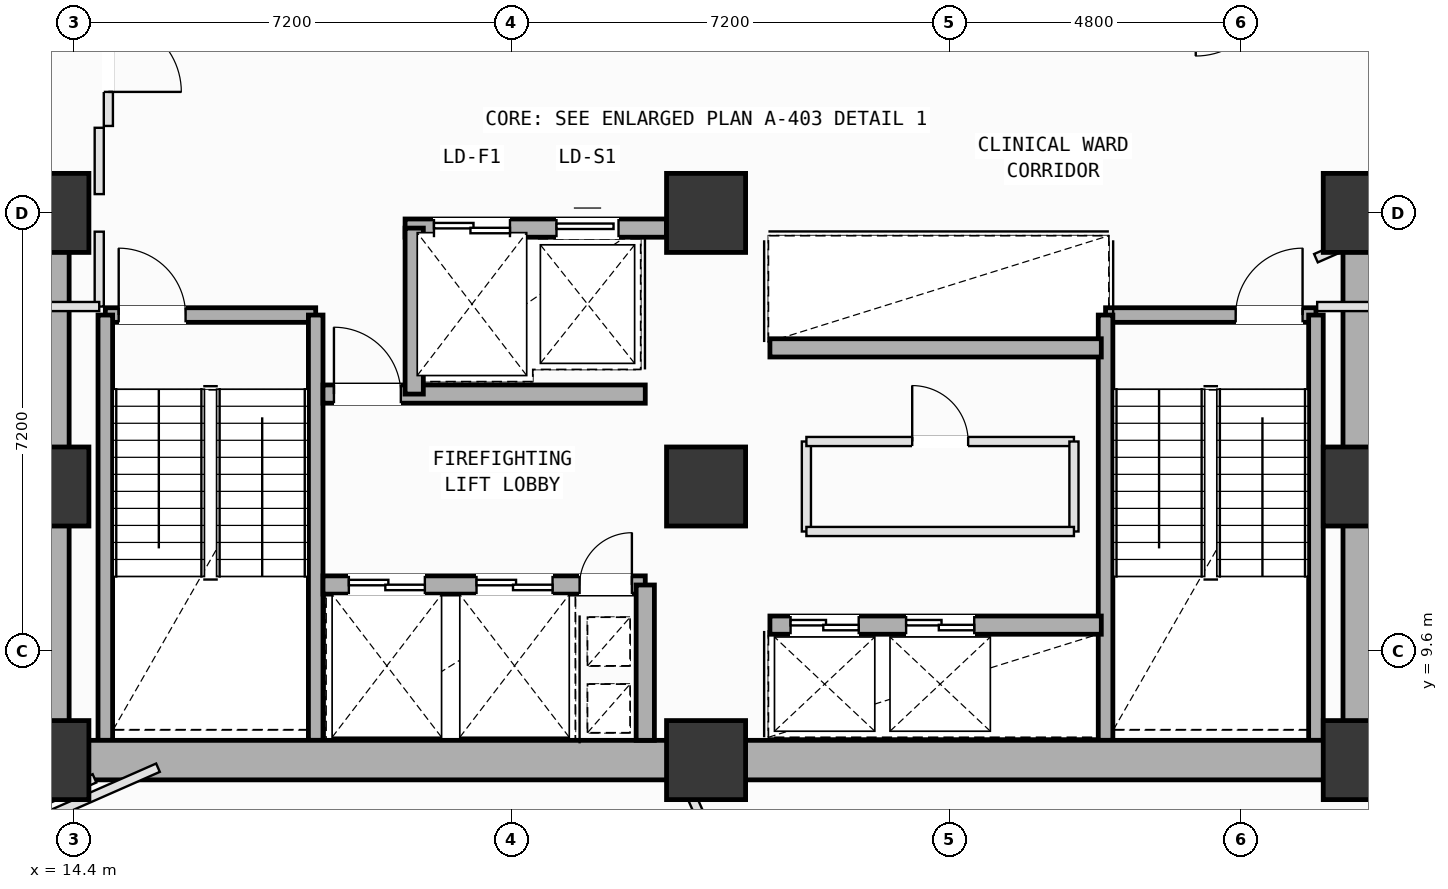
"""IFC4 building model, lengths in metres.
Left out: names, types, materials, properties, quantities, classifications, styles, units other than length and angle.
Written with IfcOpenShell. Run it as: python <this file> out.ifc"""

import sys

from ifc_helpers import new_model, si_unit, direction, frame, frame_2d, origin, origin_2d, place, context, subcontext, project, spatial, rectangle, extrude, element, fill, save


model = new_model("IFC4")
c1 = context("Model", 3, precision=1e-05, world=origin(), true_north=direction((0.0, 1.0)))
c2 = subcontext(c1, "Body", "Model", "MODEL_VIEW")
j1 = project(units=[si_unit("LENGTHUNIT", "METRE"), si_unit("PLANEANGLEUNIT", "RADIAN")], contexts=[c1])
p1 = place(None, origin())
s1 = spatial("IfcSite", under=j1, at=p1, CompositionType="ELEMENT")
p2 = place(p1, origin())
s2 = spatial("IfcBuilding", under=s1, at=p2, CompositionType="ELEMENT")
p3 = place(p2, frame((0.0, 0.0, 124.4)))
s3 = spatial("IfcBuildingStorey", under=s2, at=p3, CompositionType="ELEMENT", Elevation=124.4)
for number, where, z_axis, x_axis in (
    (1, (14.0, 7.8, 0.0), (0.0, 0.0, 1.0), (1.0, 0.0, 0.0)),
    (2, (14.0, 12.3, 0.0), (0.0, 0.0, 1.0), (1.0, 0.0, 0.0)),
    (3, (14.0, 16.8, 0.0), (0.0, 0.0, 1.0), (1.0, 0.0, 0.0)),
    (4, (24.8, 7.8, 0.0), (0.0, 0.0, 1.0), (1.0, 0.0, 0.0)),
    (5, (24.8, 12.3, 0.0), (0.0, 0.0, 1.0), (1.0, 0.0, 0.0)),
    (6, (24.8, 16.8, 0.0), (0.0, 0.0, 1.0), (1.0, 0.0, 0.0)),
    (7, (35.6, 7.8, 0.0), (0.0, 0.0, 1.0), (1.0, 0.0, 0.0)),
    (8, (35.6, 12.3, 0.0), (0.0, 0.0, 1.0), (1.0, 0.0, 0.0)),
    (9, (35.6, 16.8, 0.0), (0.0, 0.0, 1.0), (1.0, 0.0, 0.0)),
):
    element("IfcColumn", number, at=place(p3, frame(where, z_axis=z_axis, x_axis=x_axis)), inside=s3, PredefinedType="COLUMN", context=c2, shape_type="SweptSolid", body=[
        extrude(rectangle(XDim=1.3, YDim=1.3, at=origin_2d()), origin(), (0.0, 0.0, 1.0), 4.0),
    ])
p4 = place(p3, frame((14.92, 15.12, 0.0), z_axis=(0.0, 0.0, 1.0), x_axis=(1.0, 0.0, 0.0)))
e10 = element("IfcWall", 10, at=p4, inside=s3, PredefinedType="SOLIDWALL", context=c2, shape_type="SweptSolid", body=[
    extrude(rectangle(XDim=3.46, YDim=0.24, at=frame_2d((1.73, 0.0))), origin(), (0.0, 0.0, 1.0), 3.78),
])
p5 = place(p4, frame((0.22, 0.0, 0.0)))
e11 = element("IfcOpeningElement", 11, at=p5, cuts=e10, PredefinedType="OPENING", context=c2, shape_type="SweptSolid", body=[
    extrude(rectangle(XDim=1.1, YDim=2.15, at=frame_2d((0.55, 1.075))), frame((0.0, 0.13, 0.0), z_axis=(0.0, -1.0, 0.0), x_axis=(1.0, 0.0, 0.0)), (0.0, 0.0, 1.0), 0.26),
])
for number, where, z_axis, x_axis in (
    (12, (18.38, 15.12, 0.0), (0.0, 0.0, 1.0), (0.0, -1.0, 0.0)),
    (13, (14.92, 8.125, 0.0), (0.0, 0.0, 1.0), (0.0, 1.0, 0.0)),
):
    element("IfcWall", number, at=place(p3, frame(where, z_axis=z_axis, x_axis=x_axis)), inside=s3, PredefinedType="SOLIDWALL", context=c2, shape_type="SweptSolid", body=[
        extrude(rectangle(XDim=6.995, YDim=0.24, at=frame_2d((3.498, 0.0))), origin(), (0.0, 0.0, 1.0), 3.78),
    ])
p6 = place(p3, frame((31.37, 15.12, 0.0), z_axis=(0.0, 0.0, 1.0), x_axis=(1.0, 0.0, 0.0)))
e14 = element("IfcWall", 14, at=p6, inside=s3, PredefinedType="SOLIDWALL", context=c2, shape_type="SweptSolid", body=[
    extrude(rectangle(XDim=3.46, YDim=0.24, at=frame_2d((1.73, 0.0))), origin(), (0.0, 0.0, 1.0), 3.78),
])
p7 = place(p6, frame((2.14, 0.0, 0.0)))
e15 = element("IfcOpeningElement", 15, at=p7, cuts=e14, PredefinedType="OPENING", context=c2, shape_type="SweptSolid", body=[
    extrude(rectangle(XDim=1.1, YDim=2.15, at=frame_2d((0.55, 1.075))), frame((0.0, 0.13, 0.0), z_axis=(0.0, -1.0, 0.0), x_axis=(1.0, 0.0, 0.0)), (0.0, 0.0, 1.0), 0.26),
])
for number, where, z_axis, x_axis in (
    (16, (34.83, 15.12, 0.0), (0.0, 0.0, 1.0), (0.0, -1.0, 0.0)),
    (17, (31.37, 8.125, 0.0), (0.0, 0.0, 1.0), (0.0, 1.0, 0.0)),
):
    element("IfcWall", number, at=place(p3, frame(where, z_axis=z_axis, x_axis=x_axis)), inside=s3, PredefinedType="SOLIDWALL", context=c2, shape_type="SweptSolid", body=[
        extrude(rectangle(XDim=6.995, YDim=0.24, at=frame_2d((3.498, 0.0))), origin(), (0.0, 0.0, 1.0), 3.78),
    ])
for number, where, z_axis, x_axis in (
    (18, (14.0, 7.8, 0.0), (0.0, 0.0, 1.0), (1.0, 0.0, 0.0)),
    (19, (24.8, 7.8, 0.0), (0.0, 0.0, 1.0), (1.0, 0.0, 0.0)),
):
    element("IfcWall", number, at=place(p3, frame(where, z_axis=z_axis, x_axis=x_axis)), inside=s3, PredefinedType="SHEAR", context=c2, shape_type="SweptSolid", body=[
        extrude(rectangle(XDim=10.8, YDim=0.65, at=frame_2d((5.4, 0.0))), origin(), (0.0, 0.0, 1.0), 3.78),
    ])
for number, where, z_axis, x_axis in (
    (20, (35.6, 7.8, 0.0), (0.0, 0.0, 1.0), (0.0, 1.0, 0.0)),
    (21, (14.0, 16.8, 0.0), (0.0, 0.0, 1.0), (0.0, -1.0, 0.0)),
):
    element("IfcWall", number, at=place(p3, frame(where, z_axis=z_axis, x_axis=x_axis)), inside=s3, PredefinedType="SHEAR", context=c2, shape_type="SweptSolid", body=[
        extrude(rectangle(XDim=9.0, YDim=0.65, at=frame_2d((4.5, 0.0))), origin(), (0.0, 0.0, 1.0), 3.78),
    ])
p8 = place(p3, frame((19.85, 16.55, 0.0), z_axis=(0.0, 0.0, 1.0), x_axis=(1.0, 0.0, 0.0)))
e22 = element("IfcWall", 22, at=p8, inside=s3, PredefinedType="SOLIDWALL", context=c2, shape_type="SweptSolid", body=[
    extrude(rectangle(XDim=4.3, YDim=0.3, at=frame_2d((2.15, 0.0))), origin(), (0.0, 0.0, 1.0), 3.78),
])
p9 = place(p8, frame((0.475, 0.0, 0.0)))
e23 = element("IfcOpeningElement", 23, at=p9, cuts=e22, PredefinedType="OPENING", context=c2, shape_type="SweptSolid", body=[
    extrude(rectangle(XDim=1.25, YDim=2.18, at=frame_2d((0.625, 1.09))), frame((0.0, 0.16, 0.0), z_axis=(0.0, -1.0, 0.0), x_axis=(1.0, 0.0, 0.0)), (0.0, 0.0, 1.0), 0.32),
])
p10 = place(p8, frame((2.49, 0.0, 0.0)))
e24 = element("IfcOpeningElement", 24, at=p10, cuts=e22, PredefinedType="OPENING", context=c2, shape_type="SweptSolid", body=[
    extrude(rectangle(XDim=1.02, YDim=2.12, at=frame_2d((0.51, 1.06))), frame((0.0, 0.16, 0.0), z_axis=(0.0, -1.0, 0.0), x_axis=(1.0, 0.0, 0.0)), (0.0, 0.0, 1.0), 0.32),
])
p11 = place(p3, frame((18.5, 10.68, 0.0), z_axis=(0.0, 0.0, 1.0), x_axis=(1.0, 0.0, 0.0)))
e25 = element("IfcWall", 25, at=p11, inside=s3, PredefinedType="SOLIDWALL", context=c2, shape_type="SweptSolid", body=[
    extrude(rectangle(XDim=5.3, YDim=0.3, at=frame_2d((2.65, 0.0))), origin(), (0.0, 0.0, 1.0), 3.78),
])
p12 = place(p11, frame((4.22, 0.0, 0.0)))
e26 = element("IfcOpeningElement", 26, at=p12, cuts=e25, PredefinedType="OPENING", context=c2, shape_type="SweptSolid", body=[
    extrude(rectangle(XDim=0.86, YDim=2.06, at=frame_2d((0.43, 1.03))), frame((0.0, 0.16, 0.0), z_axis=(0.0, -1.0, 0.0), x_axis=(1.0, 0.0, 0.0)), (0.0, 0.0, 1.0), 0.32),
])
p13 = place(p11, frame((0.425, 0.0, 0.0)))
e27 = element("IfcOpeningElement", 27, at=p13, cuts=e25, PredefinedType="OPENING", context=c2, shape_type="SweptSolid", body=[
    extrude(rectangle(XDim=1.25, YDim=2.18, at=frame_2d((0.625, 1.09))), frame((0.0, 0.16, 0.0), z_axis=(0.0, -1.0, 0.0), x_axis=(1.0, 0.0, 0.0)), (0.0, 0.0, 1.0), 0.32),
])
p14 = place(p11, frame((2.525, 0.0, 0.0)))
e28 = element("IfcOpeningElement", 28, at=p14, cuts=e25, PredefinedType="OPENING", context=c2, shape_type="SweptSolid", body=[
    extrude(rectangle(XDim=1.25, YDim=2.18, at=frame_2d((0.625, 1.09))), frame((0.0, 0.16, 0.0), z_axis=(0.0, -1.0, 0.0), x_axis=(1.0, 0.0, 0.0)), (0.0, 0.0, 1.0), 0.32),
])
p15 = place(p3, frame((18.5, 13.82, 0.0), z_axis=(0.0, 0.0, 1.0), x_axis=(1.0, 0.0, 0.0)))
e29 = element("IfcWall", 29, at=p15, inside=s3, PredefinedType="SOLIDWALL", context=c2, shape_type="SweptSolid", body=[
    extrude(rectangle(XDim=5.3, YDim=0.3, at=frame_2d((2.65, 0.0))), origin(), (0.0, 0.0, 1.0), 3.78),
])
p16 = place(p15, frame((0.18, 0.0, 0.0)))
e30 = element("IfcOpeningElement", 30, at=p16, cuts=e29, PredefinedType="OPENING", context=c2, shape_type="SweptSolid", body=[
    extrude(rectangle(XDim=1.1, YDim=2.15, at=frame_2d((0.55, 1.075))), frame((0.0, 0.16, 0.0), z_axis=(0.0, -1.0, 0.0), x_axis=(1.0, 0.0, 0.0)), (0.0, 0.0, 1.0), 0.32),
])
p17 = place(p3, frame((23.8, 8.125, 0.0), z_axis=(0.0, 0.0, 1.0), x_axis=(0.0, 1.0, 0.0)))
e31 = element("IfcWall", 31, at=p17, inside=s3, PredefinedType="SOLIDWALL", context=c2, shape_type="SweptSolid", body=[
    extrude(rectangle(XDim=2.555, YDim=0.3, at=frame_2d((1.277, 0.0))), origin(), (0.0, 0.0, 1.0), 3.78),
])
p18 = place(p3, frame((20.0, 13.82, 0.0), z_axis=(0.0, 0.0, 1.0), x_axis=(0.0, 1.0, 0.0)))
e32 = element("IfcWall", 32, at=p18, inside=s3, PredefinedType="SOLIDWALL", context=c2, shape_type="SweptSolid", body=[
    extrude(rectangle(XDim=2.73, YDim=0.3, at=frame_2d((1.365, 0.0))), origin(), (0.0, 0.0, 1.0), 3.78),
])
p19 = place(p3, frame((25.85, 10.02, 0.0), z_axis=(0.0, 0.0, 1.0), x_axis=(1.0, 0.0, 0.0)))
e33 = element("IfcWall", 33, at=p19, inside=s3, PredefinedType="SOLIDWALL", context=c2, shape_type="SweptSolid", body=[
    extrude(rectangle(XDim=5.45, YDim=0.3, at=frame_2d((2.725, 0.0))), origin(), (0.0, 0.0, 1.0), 3.78),
])
p20 = place(p19, frame((0.34, 0.0, 0.0)))
e34 = element("IfcOpeningElement", 34, at=p20, cuts=e33, PredefinedType="OPENING", context=c2, shape_type="SweptSolid", body=[
    extrude(rectangle(XDim=1.12, YDim=2.15, at=frame_2d((0.56, 1.075))), frame((0.0, 0.16, 0.0), z_axis=(0.0, -1.0, 0.0), x_axis=(1.0, 0.0, 0.0)), (0.0, 0.0, 1.0), 0.32),
])
p21 = place(p19, frame((2.24, 0.0, 0.0)))
e35 = element("IfcOpeningElement", 35, at=p21, cuts=e33, PredefinedType="OPENING", context=c2, shape_type="SweptSolid", body=[
    extrude(rectangle(XDim=1.12, YDim=2.15, at=frame_2d((0.56, 1.075))), frame((0.0, 0.16, 0.0), z_axis=(0.0, -1.0, 0.0), x_axis=(1.0, 0.0, 0.0)), (0.0, 0.0, 1.0), 0.32),
])
p22 = place(p3, frame((25.85, 14.58, 0.0), z_axis=(0.0, 0.0, 1.0), x_axis=(1.0, 0.0, 0.0)))
e36 = element("IfcWall", 36, at=p22, inside=s3, PredefinedType="SOLIDWALL", context=c2, shape_type="SweptSolid", body=[
    extrude(rectangle(XDim=5.45, YDim=0.3, at=frame_2d((2.725, 0.0))), origin(), (0.0, 0.0, 1.0), 3.78),
])
p23 = place(p3, frame((26.45, 11.56, 0.0), z_axis=(0.0, 0.0, 1.0), x_axis=(0.0, 1.0, 0.0)))
e37 = element("IfcWall", 37, at=p23, inside=s3, PredefinedType="PARTITIONING", context=c2, shape_type="SweptSolid", body=[
    extrude(rectangle(XDim=1.48, YDim=0.15, at=frame_2d((0.74, 0.0))), origin(), (0.0, 0.0, 1.0), 3.78),
])
p24 = place(p3, frame((26.45, 13.04, 0.0), z_axis=(0.0, 0.0, 1.0), x_axis=(1.0, 0.0, 0.0)))
e38 = element("IfcWall", 38, at=p24, inside=s3, PredefinedType="PARTITIONING", context=c2, shape_type="SweptSolid", body=[
    extrude(rectangle(XDim=4.4, YDim=0.15, at=frame_2d((2.2, 0.0))), origin(), (0.0, 0.0, 1.0), 3.78),
])
p25 = place(p24, frame((1.74, 0.0, 0.0)))
e39 = element("IfcOpeningElement", 39, at=p25, cuts=e38, PredefinedType="OPENING", context=c2, shape_type="SweptSolid", body=[
    extrude(rectangle(XDim=0.92, YDim=2.1, at=frame_2d((0.46, 1.05))), frame((0.0, 0.085, 0.0), z_axis=(0.0, -1.0, 0.0), x_axis=(1.0, 0.0, 0.0)), (0.0, 0.0, 1.0), 0.17),
])
p26 = place(p3, frame((30.85, 13.04, 0.0), z_axis=(0.0, 0.0, 1.0), x_axis=(0.0, -1.0, 0.0)))
e40 = element("IfcWall", 40, at=p26, inside=s3, PredefinedType="PARTITIONING", context=c2, shape_type="SweptSolid", body=[
    extrude(rectangle(XDim=1.48, YDim=0.15, at=frame_2d((0.74, 0.0))), origin(), (0.0, 0.0, 1.0), 3.78),
])
p27 = place(p3, frame((30.85, 11.56, 0.0), z_axis=(0.0, 0.0, 1.0), x_axis=(-1.0, 0.0, 0.0)))
e41 = element("IfcWall", 41, at=p27, inside=s3, PredefinedType="PARTITIONING", context=c2, shape_type="SweptSolid", body=[
    extrude(rectangle(XDim=4.4, YDim=0.15, at=frame_2d((2.2, 0.0))), origin(), (0.0, 0.0, 1.0), 3.78),
])
p28 = place(p3, frame((12.022, 6.019, 0.0), z_axis=(0.0, 0.0, 1.0), x_axis=(0.915325537468, 0.402714738318, 0.0)))
e42 = element("IfcWall", 42, at=p28, inside=s3, PredefinedType="PARTITIONING", context=c2, shape_type="SweptSolid", body=[
    extrude(rectangle(XDim=4.112, YDim=0.15, at=frame_2d((2.056, 0.0))), origin(), (0.0, 0.0, 1.0), 3.78),
])
p29 = place(p3, frame((24.431, 7.5, 0.0), z_axis=(0.0, 0.0, 1.0), x_axis=(0.402805885954, -0.915285429929, 0.0)))
e43 = element("IfcWall", 43, at=p29, inside=s3, PredefinedType="PARTITIONING", context=c2, shape_type="SweptSolid", body=[
    extrude(rectangle(XDim=9.973, YDim=0.15, at=frame_2d((4.986, 0.0))), origin(), (0.0, 0.0, 1.0), 3.78),
])
p30 = place(p29, frame((4.556, 0.0, 0.0)))
e44 = element("IfcOpeningElement", 44, at=p30, cuts=e43, PredefinedType="OPENING", context=c2, shape_type="SweptSolid", body=[
    extrude(rectangle(XDim=0.86, YDim=2.06, at=frame_2d((0.43, 1.03))), frame((0.0, 0.085, 0.0), z_axis=(0.0, -1.0, 0.0), x_axis=(1.0, 0.0, 0.0)), (0.0, 0.0, 1.0), 0.17),
])
p31 = place(p3, frame((35.6, 7.5, 0.0), z_axis=(0.0, 0.0, 1.0), x_axis=(1.0, 0.0, 0.0)))
e45 = element("IfcWall", 45, at=p31, inside=s3, PredefinedType="PARTITIONING", context=c2, shape_type="SweptSolid", body=[
    extrude(rectangle(XDim=0.55, YDim=0.15, at=frame_2d((0.275, 0.0))), origin(), (0.0, 0.0, 1.0), 2.965),
])
p32 = place(p3, frame((34.83, 16.055, 0.0), z_axis=(0.0, 0.0, 1.0), x_axis=(0.915380147415, 0.402590593182, 0.0)))
e46 = element("IfcWall", 46, at=p32, inside=s3, PredefinedType="PARTITIONING", context=c2, shape_type="SweptSolid", body=[
    extrude(rectangle(XDim=1.105, YDim=0.15, at=frame_2d((0.553, 0.0))), origin(), (0.0, 0.0, 1.0), 2.945),
])
p33 = place(p3, frame((36.15, 15.26, 0.0), z_axis=(0.0, 0.0, 1.0), x_axis=(-1.0, 0.0, 0.0)))
e47 = element("IfcWall", 47, at=p33, inside=s3, PredefinedType="PARTITIONING", context=c2, shape_type="SweptSolid", body=[
    extrude(rectangle(XDim=1.3, YDim=0.15, at=frame_2d((0.65, 0.0))), origin(), (0.0, 0.0, 1.0), 3.78),
])
p34 = place(p3, frame((14.97, 20.55, 0.0), z_axis=(0.0, 0.0, 1.0), x_axis=(0.0, -1.0, 0.0)))
e48 = element("IfcWall", 48, at=p34, inside=s3, PredefinedType="PARTITIONING", context=c2, shape_type="SweptSolid", body=[
    extrude(rectangle(XDim=2.32, YDim=0.15, at=frame_2d((1.16, 0.0))), origin(), (0.0, 0.0, 1.0), 3.78),
])
p35 = place(p34, frame((0.56, 0.0, 0.0)))
e49 = element("IfcOpeningElement", 49, at=p35, cuts=e48, PredefinedType="OPENING", context=c2, shape_type="SweptSolid", body=[
    extrude(rectangle(XDim=1.2, YDim=2.15, at=frame_2d((0.6, 1.075))), frame((0.0, 0.085, 0.0), z_axis=(0.0, -1.0, 0.0), x_axis=(1.0, 0.0, 0.0)), (0.0, 0.0, 1.0), 0.17),
])
p36 = place(p3, frame((14.82, 18.2, 0.0), z_axis=(0.0, 0.0, 1.0), x_axis=(0.0, -1.0, 0.0)))
e50 = element("IfcWall", 50, at=p36, inside=s3, PredefinedType="PARTITIONING", context=c2, shape_type="SweptSolid", body=[
    extrude(rectangle(XDim=1.091, YDim=0.15, at=frame_2d((0.545, 0.0))), origin(), (0.0, 0.0, 1.0), 3.78),
])
p37 = place(p3, frame((14.82, 16.491, 0.0), z_axis=(0.0, 0.0, 1.0), x_axis=(0.0, -1.0, 0.0)))
e51 = element("IfcWall", 51, at=p37, inside=s3, PredefinedType="PARTITIONING", context=c2, shape_type="SweptSolid", body=[
    extrude(rectangle(XDim=1.231, YDim=0.15, at=frame_2d((0.615, 0.0))), origin(), (0.0, 0.0, 1.0), 3.78),
])
p38 = place(p3, frame((14.82, 15.26, 0.0), z_axis=(0.0, 0.0, 1.0), x_axis=(-1.0, 0.0, 0.0)))
e52 = element("IfcWall", 52, at=p38, inside=s3, PredefinedType="PARTITIONING", context=c2, shape_type="SweptSolid", body=[
    extrude(rectangle(XDim=1.12, YDim=0.15, at=frame_2d((0.56, 0.0))), origin(), (0.0, 0.0, 1.0), 3.78),
])
p39 = place(p3, frame((14.742, 7.5, 0.0), z_axis=(0.0, 0.0, 1.0), x_axis=(-0.915322030836, -0.402722708408, 0.0)))
e53 = element("IfcWall", 53, at=p39, inside=s3, PredefinedType="PARTITIONING", context=c2, shape_type="SweptSolid", body=[
    extrude(rectangle(XDim=3.086, YDim=0.15, at=frame_2d((1.543, 0.0))), origin(), (0.0, 0.0, 1.0), 3.78),
])
p40 = place(p3, frame((6.584, 18.376, 0.0), z_axis=(0.0, 0.0, 1.0), x_axis=(0.915349059645, 0.402661270806, 0.0)))
e54 = element("IfcWall", 54, at=p40, inside=s3, PredefinedType="PARTITIONING", context=c2, shape_type="SweptSolid", body=[
    extrude(rectangle(XDim=9.415, YDim=0.15, at=frame_2d((4.708, 0.0))), origin(), (0.0, 0.0, 1.0), 3.78),
])
p41 = place(p5, origin())
e55 = element("IfcDoor", 55, at=p41, inside=s3, OperationType="SINGLE_SWING_LEFT", PredefinedType="DOOR", context=c2, shape_type="SweptSolid", body=[
    extrude(rectangle(XDim=1.1, YDim=2.15, at=frame_2d((0.55, 1.075))), frame((0.0, 0.025, 0.0), z_axis=(0.0, -1.0, 0.0), x_axis=(1.0, 0.0, 0.0)), (0.0, 0.0, 1.0), 0.05),
])
fill(e11, e55)
p42 = place(p7, origin())
e56 = element("IfcDoor", 56, at=p42, inside=s3, OperationType="SINGLE_SWING_RIGHT", PredefinedType="DOOR", context=c2, shape_type="SweptSolid", body=[
    extrude(rectangle(XDim=1.1, YDim=2.15, at=frame_2d((0.55, 1.075))), frame((0.0, 0.025, 0.0), z_axis=(0.0, -1.0, 0.0), x_axis=(1.0, 0.0, 0.0)), (0.0, 0.0, 1.0), 0.05),
])
fill(e15, e56)
p43 = place(p12, origin())
e57 = element("IfcDoor", 57, at=p43, inside=s3, OperationType="SINGLE_SWING_RIGHT", PredefinedType="DOOR", context=c2, shape_type="SweptSolid", body=[
    extrude(rectangle(XDim=0.86, YDim=2.06, at=frame_2d((0.43, 1.03))), frame((0.0, 0.025, 0.0), z_axis=(0.0, -1.0, 0.0), x_axis=(1.0, 0.0, 0.0)), (0.0, 0.0, 1.0), 0.05),
])
fill(e26, e57)
p44 = place(p16, origin())
e58 = element("IfcDoor", 58, at=p44, inside=s3, OperationType="SINGLE_SWING_LEFT", PredefinedType="DOOR", context=c2, shape_type="SweptSolid", body=[
    extrude(rectangle(XDim=1.1, YDim=2.15, at=frame_2d((0.55, 1.075))), frame((0.0, 0.025, 0.0), z_axis=(0.0, -1.0, 0.0), x_axis=(1.0, 0.0, 0.0)), (0.0, 0.0, 1.0), 0.05),
])
fill(e30, e58)
p45 = place(p13, origin())
e59 = element("IfcDoor", 59, at=p45, inside=s3, OperationType="DOUBLE_DOOR_SLIDING", PredefinedType="DOOR", context=c2, shape_type="SweptSolid", body=[
    extrude(rectangle(XDim=1.25, YDim=2.18, at=frame_2d((0.625, 1.09))), frame((0.0, 0.025, 0.0), z_axis=(0.0, -1.0, 0.0), x_axis=(1.0, 0.0, 0.0)), (0.0, 0.0, 1.0), 0.05),
])
fill(e27, e59)
p46 = place(p14, origin())
e60 = element("IfcDoor", 60, at=p46, inside=s3, OperationType="DOUBLE_DOOR_SLIDING", PredefinedType="DOOR", context=c2, shape_type="SweptSolid", body=[
    extrude(rectangle(XDim=1.25, YDim=2.18, at=frame_2d((0.625, 1.09))), frame((0.0, 0.025, 0.0), z_axis=(0.0, -1.0, 0.0), x_axis=(1.0, 0.0, 0.0)), (0.0, 0.0, 1.0), 0.05),
])
fill(e28, e60)
p47 = place(p20, origin())
e61 = element("IfcDoor", 61, at=p47, inside=s3, OperationType="DOUBLE_DOOR_SLIDING", PredefinedType="DOOR", context=c2, shape_type="SweptSolid", body=[
    extrude(rectangle(XDim=1.12, YDim=2.15, at=frame_2d((0.56, 1.075))), frame((0.0, 0.025, 0.0), z_axis=(0.0, -1.0, 0.0), x_axis=(1.0, 0.0, 0.0)), (0.0, 0.0, 1.0), 0.05),
])
fill(e34, e61)
p48 = place(p21, origin())
e62 = element("IfcDoor", 62, at=p48, inside=s3, OperationType="DOUBLE_DOOR_SLIDING", PredefinedType="DOOR", context=c2, shape_type="SweptSolid", body=[
    extrude(rectangle(XDim=1.12, YDim=2.15, at=frame_2d((0.56, 1.075))), frame((0.0, 0.025, 0.0), z_axis=(0.0, -1.0, 0.0), x_axis=(1.0, 0.0, 0.0)), (0.0, 0.0, 1.0), 0.05),
])
fill(e35, e62)
p49 = place(p9, origin())
e63 = element("IfcDoor", 63, at=p49, inside=s3, OperationType="DOUBLE_DOOR_SLIDING", PredefinedType="DOOR", context=c2, shape_type="SweptSolid", body=[
    extrude(rectangle(XDim=1.25, YDim=2.18, at=frame_2d((0.625, 1.09))), frame((0.0, 0.025, 0.0), z_axis=(0.0, -1.0, 0.0), x_axis=(1.0, 0.0, 0.0)), (0.0, 0.0, 1.0), 0.05),
])
fill(e23, e63)
p50 = place(p10, origin())
e64 = element("IfcDoor", 64, at=p50, inside=s3, OperationType="SLIDING_TO_LEFT", PredefinedType="DOOR", context=c2, shape_type="SweptSolid", body=[
    extrude(rectangle(XDim=1.02, YDim=2.12, at=frame_2d((0.51, 1.06))), frame((0.0, 0.025, 0.0), z_axis=(0.0, -1.0, 0.0), x_axis=(1.0, 0.0, 0.0)), (0.0, 0.0, 1.0), 0.05),
])
fill(e24, e64)
p51 = place(p25, origin())
e65 = element("IfcDoor", 65, at=p51, inside=s3, OperationType="SINGLE_SWING_LEFT", PredefinedType="DOOR", context=c2, shape_type="SweptSolid", body=[
    extrude(rectangle(XDim=0.92, YDim=2.1, at=frame_2d((0.46, 1.05))), frame((0.0, 0.025, 0.0), z_axis=(0.0, -1.0, 0.0), x_axis=(1.0, 0.0, 0.0)), (0.0, 0.0, 1.0), 0.05),
])
fill(e39, e65)
p52 = place(p35, origin())
e66 = element("IfcDoor", 66, at=p52, inside=s3, OperationType="SINGLE_SWING_RIGHT", PredefinedType="DOOR", context=c2, shape_type="SweptSolid", body=[
    extrude(rectangle(XDim=1.2, YDim=2.15, at=frame_2d((0.6, 1.075))), frame((0.0, 0.025, 0.0), z_axis=(0.0, -1.0, 0.0), x_axis=(1.0, 0.0, 0.0)), (0.0, 0.0, 1.0), 0.05),
])
fill(e49, e66)
save(model, sys.argv[1])
